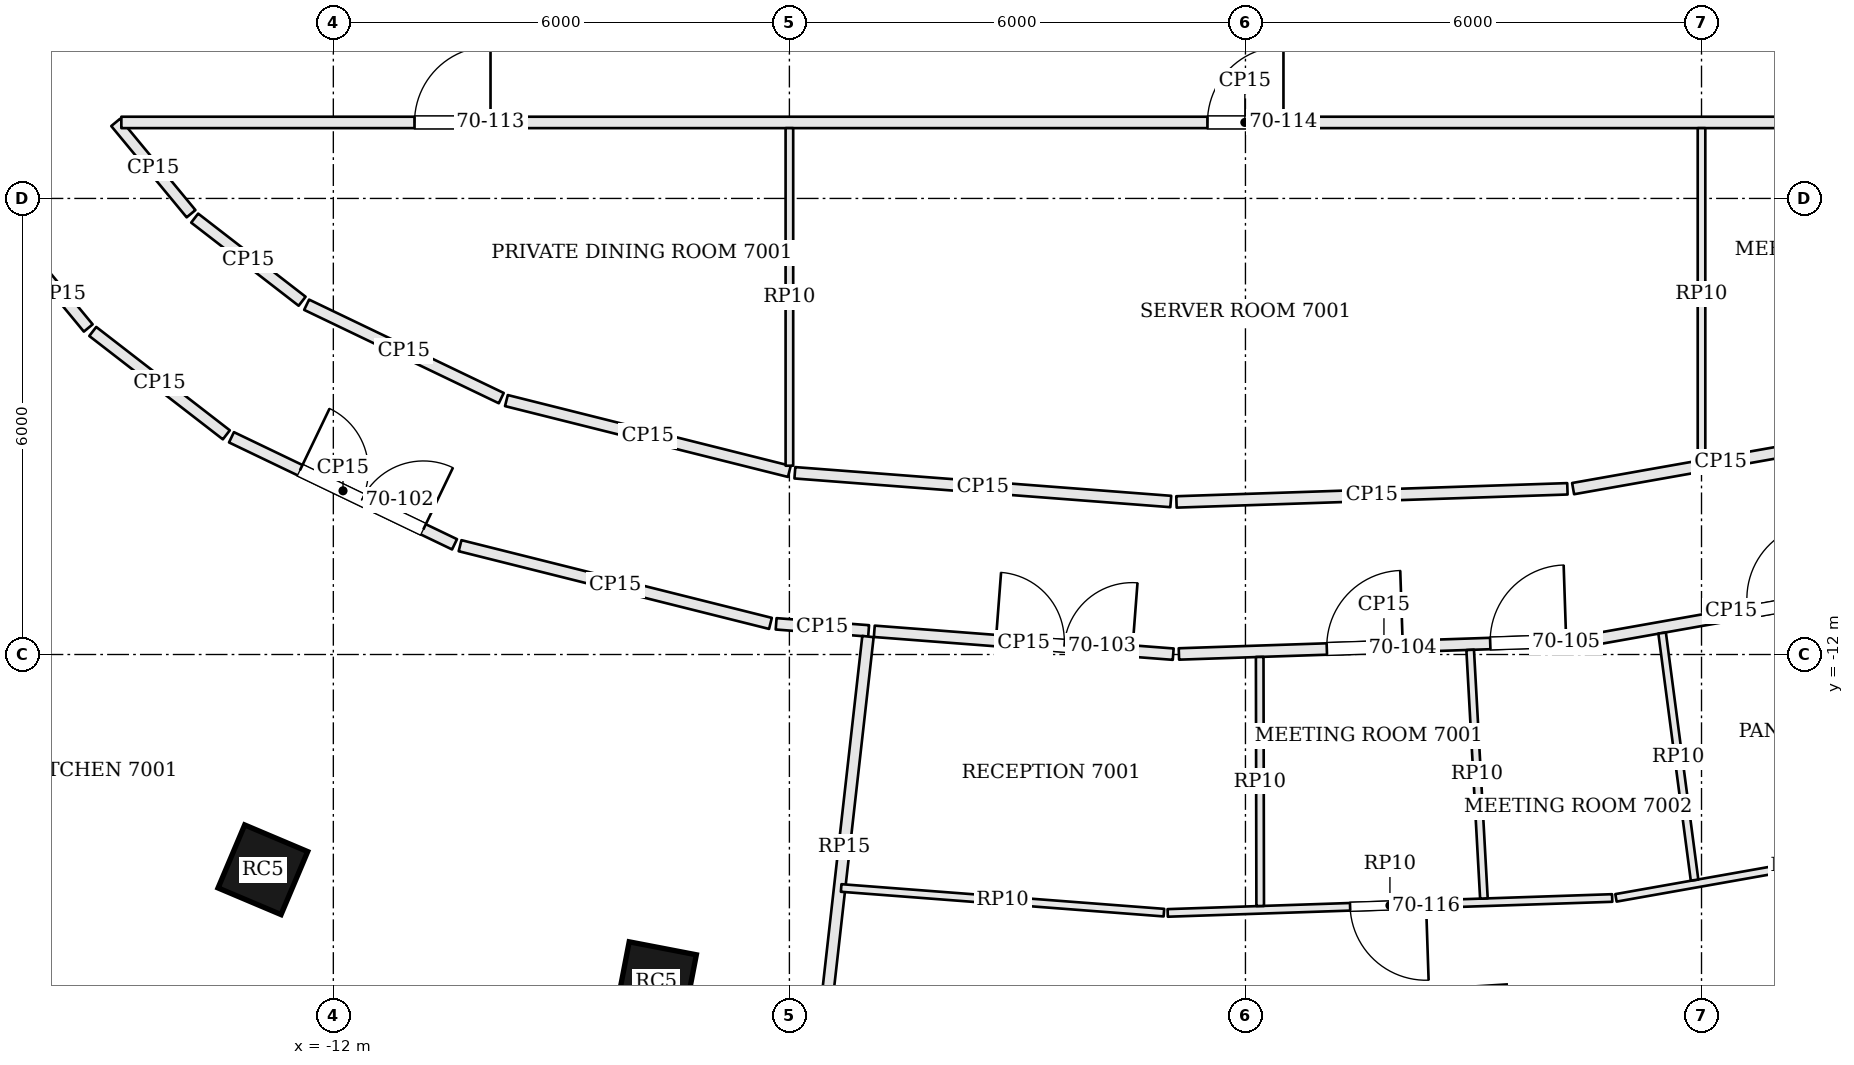
"""IFC4 building model, lengths in metres.
Left out: names, types, materials, properties, quantities, classifications, styles, units other than length and angle.
Written with IfcOpenShell. Run it as: python <this file> out.ifc"""

import sys

from ifc_helpers import new_model, si_unit, direction, frame, frame_2d, origin, origin_2d, place, context, subcontext, project, spatial, rectangle, extrude, element, fill, save


model = new_model("IFC4")
c1 = context("Model", 3, precision=1e-05, world=origin(), true_north=direction((0.0, 1.0)))
c2 = subcontext(c1, "Body", "Model", "MODEL_VIEW")
j1 = project(units=[si_unit("LENGTHUNIT", "METRE"), si_unit("PLANEANGLEUNIT", "RADIAN")], contexts=[c1])
p1 = place(None, origin())
s1 = spatial("IfcSite", under=j1, at=p1, CompositionType="ELEMENT")
p2 = place(p1, origin())
s2 = spatial("IfcBuilding", under=s1, at=p2, CompositionType="ELEMENT")
p3 = place(p2, frame((0.0, 0.0, 284.4)))
s3 = spatial("IfcBuildingStorey", under=s2, at=p3, CompositionType="ELEMENT", Elevation=284.4)
for number, where, z_axis, x_axis in (
    (1, (-12.927, -14.832, 0.0), (0.0, 0.0, 1.0), (0.921, -0.389, 0.0)),
    (2, (-7.751, -16.307, 0.0), (0.0, 0.0, 1.0), (0.982, -0.189, 0.0)),
):
    element("IfcColumn", number, at=place(p3, frame(where, z_axis=z_axis, x_axis=x_axis)), inside=s3, PredefinedType="COLUMN", context=c2, shape_type="SweptSolid", body=[
        extrude(rectangle(XDim=0.9, YDim=0.9, at=origin_2d()), origin(), (0.0, 0.0, 1.0), 3.9),
    ])
p4 = place(p3, frame((-15.97, -6.802, 0.0), z_axis=(0.0, 0.0, 1.0), x_axis=(0.636897609689, -0.770948399552, 0.0)))
e3 = element("IfcWall", 3, at=p4, inside=s3, PredefinedType="PARTITIONING", context=c2, shape_type="SweptSolid", body=[
    extrude(rectangle(XDim=1.171, YDim=0.15, at=frame_2d((0.585, 0.0))), origin(), (0.0, 0.0, 1.0), 3.198),
])
p5 = place(p3, frame((-15.165, -7.75, 0.0), z_axis=(0.0, 0.0, 1.0), x_axis=(0.790917548929, -0.611922732701, 0.0)))
e4 = element("IfcWall", 4, at=p5, inside=s3, PredefinedType="PARTITIONING", context=c2, shape_type="SweptSolid", body=[
    extrude(rectangle(XDim=2.222, YDim=0.15, at=frame_2d((1.111, 0.0))), origin(), (0.0, 0.0, 1.0), 3.198),
])
p6 = place(p3, frame((-13.34, -9.142, 0.0), z_axis=(0.0, 0.0, 1.0), x_axis=(0.901599124721, -0.432572558425, 0.0)))
e5 = element("IfcWall", 5, at=p6, inside=s3, PredefinedType="PARTITIONING", context=c2, shape_type="SweptSolid", body=[
    extrude(rectangle(XDim=3.255, YDim=0.15, at=frame_2d((1.627, 0.0))), origin(), (0.0, 0.0, 1.0), 3.198),
])
p7 = place(p6, frame((1.0, 0.0, 0.0)))
e6 = element("IfcOpeningElement", 6, at=p7, cuts=e5, PredefinedType="OPENING", context=c2, shape_type="SweptSolid", body=[
    extrude(rectangle(XDim=1.8, YDim=2.1, at=frame_2d((0.9, 1.05))), frame((0.0, 0.085, 0.0), z_axis=(0.0, -1.0, 0.0), x_axis=(1.0, 0.0, 0.0)), (0.0, 0.0, 1.0), 0.17),
])
p8 = place(p3, frame((-10.333, -10.569, 0.0), z_axis=(0.0, 0.0, 1.0), x_axis=(0.970067398009, -0.242835836151, 0.0)))
e7 = element("IfcWall", 7, at=p8, inside=s3, PredefinedType="PARTITIONING", context=c2, shape_type="SweptSolid", body=[
    extrude(rectangle(XDim=4.209, YDim=0.15, at=frame_2d((2.105, 0.0))), origin(), (0.0, 0.0, 1.0), 3.198),
])
p9 = place(p3, frame((-6.175, -11.596, 0.0), z_axis=(0.0, 0.0, 1.0), x_axis=(0.997106038867, -0.076023333621, 0.0)))
e8 = element("IfcWall", 8, at=p9, inside=s3, PredefinedType="PARTITIONING", context=c2, shape_type="SweptSolid", body=[
    extrude(rectangle(XDim=1.22, YDim=0.15, at=frame_2d((0.61, 0.0))), origin(), (0.0, 0.0, 1.0), 3.198),
])
p10 = place(p3, frame((-5.59, -17.294, 0.0), z_axis=(0.0, 0.0, 1.0), x_axis=(0.112044411854, 0.993703200041, 0.0)))
e9 = element("IfcWall", 9, at=p10, inside=s3, PredefinedType="PARTITIONING", context=c2, shape_type="SweptSolid", body=[
    extrude(rectangle(XDim=5.565, YDim=0.15, at=frame_2d((2.783, 0.0))), origin(), (0.0, 0.0, 1.0), 3.234),
])
p11 = place(p3, frame((-4.883, -11.695, 0.0), z_axis=(0.0, 0.0, 1.0), x_axis=(0.997096936577, -0.076142623207, 0.0)))
e10 = element("IfcWall", 10, at=p11, inside=s3, PredefinedType="PARTITIONING", context=c2, shape_type="SweptSolid", body=[
    extrude(rectangle(XDim=3.944, YDim=0.15, at=frame_2d((1.972, 0.0))), origin(), (0.0, 0.0, 1.0), 3.198),
])
p12 = place(p11, frame((1.604, 0.0, 0.0)))
e11 = element("IfcOpeningElement", 11, at=p12, cuts=e10, PredefinedType="OPENING", context=c2, shape_type="SweptSolid", body=[
    extrude(rectangle(XDim=1.8, YDim=2.1, at=frame_2d((0.9, 1.05))), frame((0.0, 0.085, 0.0), z_axis=(0.0, -1.0, 0.0), x_axis=(1.0, 0.0, 0.0)), (0.0, 0.0, 1.0), 0.17),
])
p13 = place(p3, frame((-0.875, -11.993, 0.0), z_axis=(0.0, 0.0, 1.0), x_axis=(0.999436745295, 0.033558786542, 0.0)))
e12 = element("IfcWall", 12, at=p13, inside=s3, PredefinedType="PARTITIONING", context=c2, shape_type="SweptSolid", body=[
    extrude(rectangle(XDim=5.398, YDim=0.15, at=frame_2d((2.699, 0.0))), origin(), (0.0, 0.0, 1.0), 3.198),
])
p14 = place(p13, frame((1.947, 0.0, 0.0)))
e13 = element("IfcOpeningElement", 13, at=p14, cuts=e12, PredefinedType="OPENING", context=c2, shape_type="SweptSolid", body=[
    extrude(rectangle(XDim=1.0, YDim=2.4, at=frame_2d((0.5, 1.2))), frame((0.0, 0.085, 0.0), z_axis=(0.0, -1.0, 0.0), x_axis=(1.0, 0.0, 0.0)), (0.0, 0.0, 1.0), 0.17),
])
p15 = place(p13, frame((4.098, 0.0, 0.0)))
e14 = element("IfcOpeningElement", 14, at=p15, cuts=e12, PredefinedType="OPENING", context=c2, shape_type="SweptSolid", body=[
    extrude(rectangle(XDim=1.0, YDim=2.4, at=frame_2d((0.5, 1.2))), frame((0.0, 0.085, 0.0), z_axis=(0.0, -1.0, 0.0), x_axis=(1.0, 0.0, 0.0)), (0.0, 0.0, 1.0), 0.17),
])
p16 = place(p3, frame((4.594, -11.799, 0.0), z_axis=(0.0, 0.0, 1.0), x_axis=(0.984693444773, 0.174295208833, 0.0)))
e15 = element("IfcWall", 15, at=p16, inside=s3, PredefinedType="PARTITIONING", context=c2, shape_type="SweptSolid", body=[
    extrude(rectangle(XDim=4.261, YDim=0.15, at=frame_2d((2.13, 0.0))), origin(), (0.0, 0.0, 1.0), 3.198),
])
p17 = place(p16, frame((2.05, 0.0, 0.0)))
e16 = element("IfcOpeningElement", 16, at=p17, cuts=e15, PredefinedType="OPENING", context=c2, shape_type="SweptSolid", body=[
    extrude(rectangle(XDim=1.0, YDim=2.1, at=frame_2d((0.5, 1.05))), frame((0.0, 0.085, 0.0), z_axis=(0.0, -1.0, 0.0), x_axis=(1.0, 0.0, 0.0)), (0.0, 0.0, 1.0), 0.17),
])
p18 = place(p3, frame((8.195, -9.13, 0.0), z_axis=(0.0, 0.0, 1.0), x_axis=(-0.9846880937, -0.174325437403, 0.0)))
e17 = element("IfcWall", 17, at=p18, inside=s3, PredefinedType="PARTITIONING", context=c2, shape_type="SweptSolid", body=[
    extrude(rectangle(XDim=3.945, YDim=0.15, at=frame_2d((1.973, 0.0))), origin(), (0.0, 0.0, 1.0), 3.198),
])
p19 = place(p3, frame((4.236, -9.82, 0.0), z_axis=(0.0, 0.0, 1.0), x_axis=(-0.999435760561, -0.033588100749, 0.0)))
e18 = element("IfcWall", 18, at=p19, inside=s3, PredefinedType="PARTITIONING", context=c2, shape_type="SweptSolid", body=[
    extrude(rectangle(XDim=5.146, YDim=0.15, at=frame_2d((2.573, 0.0))), origin(), (0.0, 0.0, 1.0), 3.198),
])
p20 = place(p3, frame((-0.982, -9.987, 0.0), z_axis=(0.0, 0.0, 1.0), x_axis=(-0.997096607341, 0.07614693447, 0.0)))
e19 = element("IfcWall", 19, at=p20, inside=s3, PredefinedType="PARTITIONING", context=c2, shape_type="SweptSolid", body=[
    extrude(rectangle(XDim=4.96, YDim=0.15, at=frame_2d((2.48, 0.0))), origin(), (0.0, 0.0, 1.0), 3.198),
])
p21 = place(p3, frame((-6.001, -9.591, 0.0), z_axis=(0.0, 0.0, 1.0), x_axis=(-0.970063855769, 0.242849986061, 0.0)))
e20 = element("IfcWall", 20, at=p21, inside=s3, PredefinedType="PARTITIONING", context=c2, shape_type="SweptSolid", body=[
    extrude(rectangle(XDim=3.837, YDim=0.15, at=frame_2d((1.919, 0.0))), origin(), (0.0, 0.0, 1.0), 3.198),
])
p22 = place(p3, frame((-9.791, -8.627, 0.0), z_axis=(0.0, 0.0, 1.0), x_axis=(-0.901598165215, 0.432574558292, 0.0)))
e21 = element("IfcWall", 21, at=p22, inside=s3, PredefinedType="PARTITIONING", context=c2, shape_type="SweptSolid", body=[
    extrude(rectangle(XDim=2.84, YDim=0.15, at=frame_2d((1.42, 0.0))), origin(), (0.0, 0.0, 1.0), 3.198),
])
p23 = place(p3, frame((-12.411, -7.353, 0.0), z_axis=(0.0, 0.0, 1.0), x_axis=(-0.790894311556, 0.611952766109, 0.0)))
e22 = element("IfcWall", 22, at=p23, inside=s3, PredefinedType="PARTITIONING", context=c2, shape_type="SweptSolid", body=[
    extrude(rectangle(XDim=1.787, YDim=0.15, at=frame_2d((0.894, 0.0))), origin(), (0.0, 0.0, 1.0), 3.198),
])
p24 = place(p3, frame((-13.872, -6.201, 0.0), z_axis=(0.0, 0.0, 1.0), x_axis=(-0.636832838855, 0.771001903601, 0.0)))
e23 = element("IfcWall", 23, at=p24, inside=s3, PredefinedType="PARTITIONING", context=c2, shape_type="SweptSolid", body=[
    extrude(rectangle(XDim=1.558, YDim=0.15, at=frame_2d((0.779, 0.0))), origin(), (0.0, 0.0, 1.0), 3.198),
])
p25 = place(p3, frame((-14.789, -5.0, 0.0), z_axis=(0.0, 0.0, 1.0), x_axis=(1.0, 0.0, 0.0)))
e24 = element("IfcWall", 24, at=p25, inside=s3, PredefinedType="PARTITIONING", context=c2, shape_type="SweptSolid", body=[
    extrude(rectangle(XDim=29.562, YDim=0.15, at=frame_2d((14.781, 0.0))), origin(), (0.0, 0.0, 1.0), 3.198),
])
p26 = place(p25, frame((3.857, 0.0, 0.0)))
e25 = element("IfcOpeningElement", 25, at=p26, cuts=e24, PredefinedType="OPENING", context=c2, shape_type="SweptSolid", body=[
    extrude(rectangle(XDim=1.0, YDim=2.4, at=frame_2d((0.5, 1.2))), frame((0.0, 0.085, 0.0), z_axis=(0.0, -1.0, 0.0), x_axis=(1.0, 0.0, 0.0)), (0.0, 0.0, 1.0), 0.17),
])
p27 = place(p25, frame((14.289, 0.0, 0.0)))
e26 = element("IfcOpeningElement", 26, at=p27, cuts=e24, PredefinedType="OPENING", context=c2, shape_type="SweptSolid", body=[
    extrude(rectangle(XDim=1.0, YDim=2.1, at=frame_2d((0.5, 1.05))), frame((0.0, 0.085, 0.0), z_axis=(0.0, -1.0, 0.0), x_axis=(1.0, 0.0, 0.0)), (0.0, 0.0, 1.0), 0.17),
])
p28 = place(p25, frame((24.713, 0.0, 0.0)))
e27 = element("IfcOpeningElement", 27, at=p28, cuts=e24, PredefinedType="OPENING", context=c2, shape_type="SweptSolid", body=[
    extrude(rectangle(XDim=1.0, YDim=2.4, at=frame_2d((0.5, 1.2))), frame((0.0, 0.085, 0.0), z_axis=(0.0, -1.0, 0.0), x_axis=(1.0, 0.0, 0.0)), (0.0, 0.0, 1.0), 0.17),
])
p29 = place(p3, frame((9.625, -14.361, 0.0), z_axis=(0.0, 0.0, 1.0), x_axis=(-0.984691710098, -0.174305008716, 0.0)))
e28 = element("IfcWall", 28, at=p29, inside=s3, PredefinedType="PARTITIONING", context=c2, shape_type="SweptSolid", body=[
    extrude(rectangle(XDim=4.824, YDim=0.1, at=frame_2d((2.412, 0.0))), origin(), (0.0, 0.0, 1.0), 3.198),
])
p30 = place(p3, frame((4.825, -15.203, 0.0), z_axis=(0.0, 0.0, 1.0), x_axis=(-0.999435699456, -0.033589918924, 0.0)))
e29 = element("IfcWall", 29, at=p30, inside=s3, PredefinedType="PARTITIONING", context=c2, shape_type="SweptSolid", body=[
    extrude(rectangle(XDim=5.851, YDim=0.1, at=frame_2d((2.926, 0.0))), origin(), (0.0, 0.0, 1.0), 3.198),
])
p31 = place(p30, frame((2.45, 0.0, 0.0)))
e30 = element("IfcOpeningElement", 30, at=p31, cuts=e29, PredefinedType="OPENING", context=c2, shape_type="SweptSolid", body=[
    extrude(rectangle(XDim=1.0, YDim=2.4, at=frame_2d((0.5, 1.2))), frame((0.0, 0.06, 0.0), z_axis=(0.0, -1.0, 0.0), x_axis=(1.0, 0.0, 0.0)), (0.0, 0.0, 1.0), 0.12),
])
p32 = place(p3, frame((-1.073, -15.396, 0.0), z_axis=(0.0, 0.0, 1.0), x_axis=(-0.997093140471, 0.076192317369, 0.0)))
e31 = element("IfcWall", 31, at=p32, inside=s3, PredefinedType="PARTITIONING", context=c2, shape_type="SweptSolid", body=[
    extrude(rectangle(XDim=4.259, YDim=0.1, at=frame_2d((2.129, 0.0))), origin(), (0.0, 0.0, 1.0), 3.198),
])
p33 = place(p3, frame((0.188, -12.032, 0.0), z_axis=(0.0, 0.0, 1.0), x_axis=(0.001937258864, -0.999998123512, 0.0)))
e32 = element("IfcWall", 32, at=p33, inside=s3, PredefinedType="PARTITIONING", context=c2, shape_type="SweptSolid", body=[
    extrude(rectangle(XDim=3.277, YDim=0.1, at=frame_2d((1.638, 0.0))), origin(), (0.0, 0.0, 1.0), 3.198),
])
p34 = place(p3, frame((2.956, -11.939, 0.0), z_axis=(0.0, 0.0, 1.0), x_axis=(0.055226477976, -0.998473853504, 0.0)))
e33 = element("IfcWall", 33, at=p34, inside=s3, PredefinedType="PARTITIONING", context=c2, shape_type="SweptSolid", body=[
    extrude(rectangle(XDim=3.276, YDim=0.1, at=frame_2d((1.638, 0.0))), origin(), (0.0, 0.0, 1.0), 3.198),
])
p35 = place(p3, frame((5.482, -11.718, 0.0), z_axis=(0.0, 0.0, 1.0), x_axis=(0.130173255727, -0.991491262439, 0.0)))
e34 = element("IfcWall", 34, at=p35, inside=s3, PredefinedType="PARTITIONING", context=c2, shape_type="SweptSolid", body=[
    extrude(rectangle(XDim=3.278, YDim=0.1, at=frame_2d((1.639, 0.0))), origin(), (0.0, 0.0, 1.0), 3.198),
])
p36 = place(p3, frame((-6.0, -9.516, 0.0), z_axis=(0.0, 0.0, 1.0), x_axis=(0.0, 1.0, 0.0)))
e35 = element("IfcWall", 35, at=p36, inside=s3, PredefinedType="PARTITIONING", context=c2, shape_type="SweptSolid", body=[
    extrude(rectangle(XDim=4.441, YDim=0.1, at=frame_2d((2.221, 0.0))), origin(), (0.0, 0.0, 1.0), 3.198),
])
p37 = place(p3, frame((6.0, -9.444, 0.0), z_axis=(0.0, 0.0, 1.0), x_axis=(0.0, 1.0, 0.0)))
e36 = element("IfcWall", 36, at=p37, inside=s3, PredefinedType="PARTITIONING", context=c2, shape_type="SweptSolid", body=[
    extrude(rectangle(XDim=4.369, YDim=0.1, at=frame_2d((2.184, 0.0))), origin(), (0.0, 0.0, 1.0), 3.198),
])
p38 = place(p7, origin())
e37 = element("IfcDoor", 37, at=p38, inside=s3, OperationType="DOUBLE_DOOR_SINGLE_SWING", PredefinedType="DOOR", context=c2, shape_type="SweptSolid", body=[
    extrude(rectangle(XDim=1.8, YDim=2.1, at=frame_2d((0.9, 1.05))), frame((0.0, 0.025, 0.0), z_axis=(0.0, -1.0, 0.0), x_axis=(1.0, 0.0, 0.0)), (0.0, 0.0, 1.0), 0.05),
])
fill(e6, e37)
p39 = place(p12, origin())
e38 = element("IfcDoor", 38, at=p39, inside=s3, OperationType="DOUBLE_DOOR_SINGLE_SWING", PredefinedType="DOOR", context=c2, shape_type="SweptSolid", body=[
    extrude(rectangle(XDim=1.8, YDim=2.1, at=frame_2d((0.9, 1.05))), frame((0.0, 0.025, 0.0), z_axis=(0.0, -1.0, 0.0), x_axis=(1.0, 0.0, 0.0)), (0.0, 0.0, 1.0), 0.05),
])
fill(e11, e38)
p40 = place(p14, origin())
e39 = element("IfcDoor", 39, at=p40, inside=s3, OperationType="SINGLE_SWING_RIGHT", PredefinedType="DOOR", context=c2, shape_type="SweptSolid", body=[
    extrude(rectangle(XDim=1.0, YDim=2.4, at=frame_2d((0.5, 1.2))), frame((0.0, 0.025, 0.0), z_axis=(0.0, -1.0, 0.0), x_axis=(1.0, 0.0, 0.0)), (0.0, 0.0, 1.0), 0.05),
])
fill(e13, e39)
p41 = place(p15, origin())
e40 = element("IfcDoor", 40, at=p41, inside=s3, OperationType="SINGLE_SWING_RIGHT", PredefinedType="DOOR", context=c2, shape_type="SweptSolid", body=[
    extrude(rectangle(XDim=1.0, YDim=2.4, at=frame_2d((0.5, 1.2))), frame((0.0, 0.025, 0.0), z_axis=(0.0, -1.0, 0.0), x_axis=(1.0, 0.0, 0.0)), (0.0, 0.0, 1.0), 0.05),
])
fill(e14, e40)
p42 = place(p26, origin())
e41 = element("IfcDoor", 41, at=p42, inside=s3, OperationType="SINGLE_SWING_RIGHT", PredefinedType="DOOR", context=c2, shape_type="SweptSolid", body=[
    extrude(rectangle(XDim=1.0, YDim=2.4, at=frame_2d((0.5, 1.2))), frame((0.0, 0.025, 0.0), z_axis=(0.0, -1.0, 0.0), x_axis=(1.0, 0.0, 0.0)), (0.0, 0.0, 1.0), 0.05),
])
fill(e25, e41)
p43 = place(p27, origin())
e42 = element("IfcDoor", 42, at=p43, inside=s3, OperationType="SINGLE_SWING_RIGHT", PredefinedType="DOOR", context=c2, shape_type="SweptSolid", body=[
    extrude(rectangle(XDim=1.0, YDim=2.1, at=frame_2d((0.5, 1.05))), frame((0.0, 0.025, 0.0), z_axis=(0.0, -1.0, 0.0), x_axis=(1.0, 0.0, 0.0)), (0.0, 0.0, 1.0), 0.05),
])
fill(e26, e42)
p44 = place(p31, origin())
e43 = element("IfcDoor", 43, at=p44, inside=s3, OperationType="SINGLE_SWING_LEFT", PredefinedType="DOOR", context=c2, shape_type="SweptSolid", body=[
    extrude(rectangle(XDim=1.0, YDim=2.4, at=frame_2d((0.5, 1.2))), frame((0.0, 0.025, 0.0), z_axis=(0.0, -1.0, 0.0), x_axis=(1.0, 0.0, 0.0)), (0.0, 0.0, 1.0), 0.05),
])
fill(e30, e43)
p45 = place(p17, origin())
e44 = element("IfcDoor", 44, at=p45, inside=s3, OperationType="SINGLE_SWING_RIGHT", PredefinedType="DOOR", context=c2, shape_type="SweptSolid", body=[
    extrude(rectangle(XDim=1.0, YDim=2.1, at=frame_2d((0.5, 1.05))), frame((0.0, 0.025, 0.0), z_axis=(0.0, -1.0, 0.0), x_axis=(1.0, 0.0, 0.0)), (0.0, 0.0, 1.0), 0.05),
])
fill(e16, e44)
save(model, sys.argv[1])
